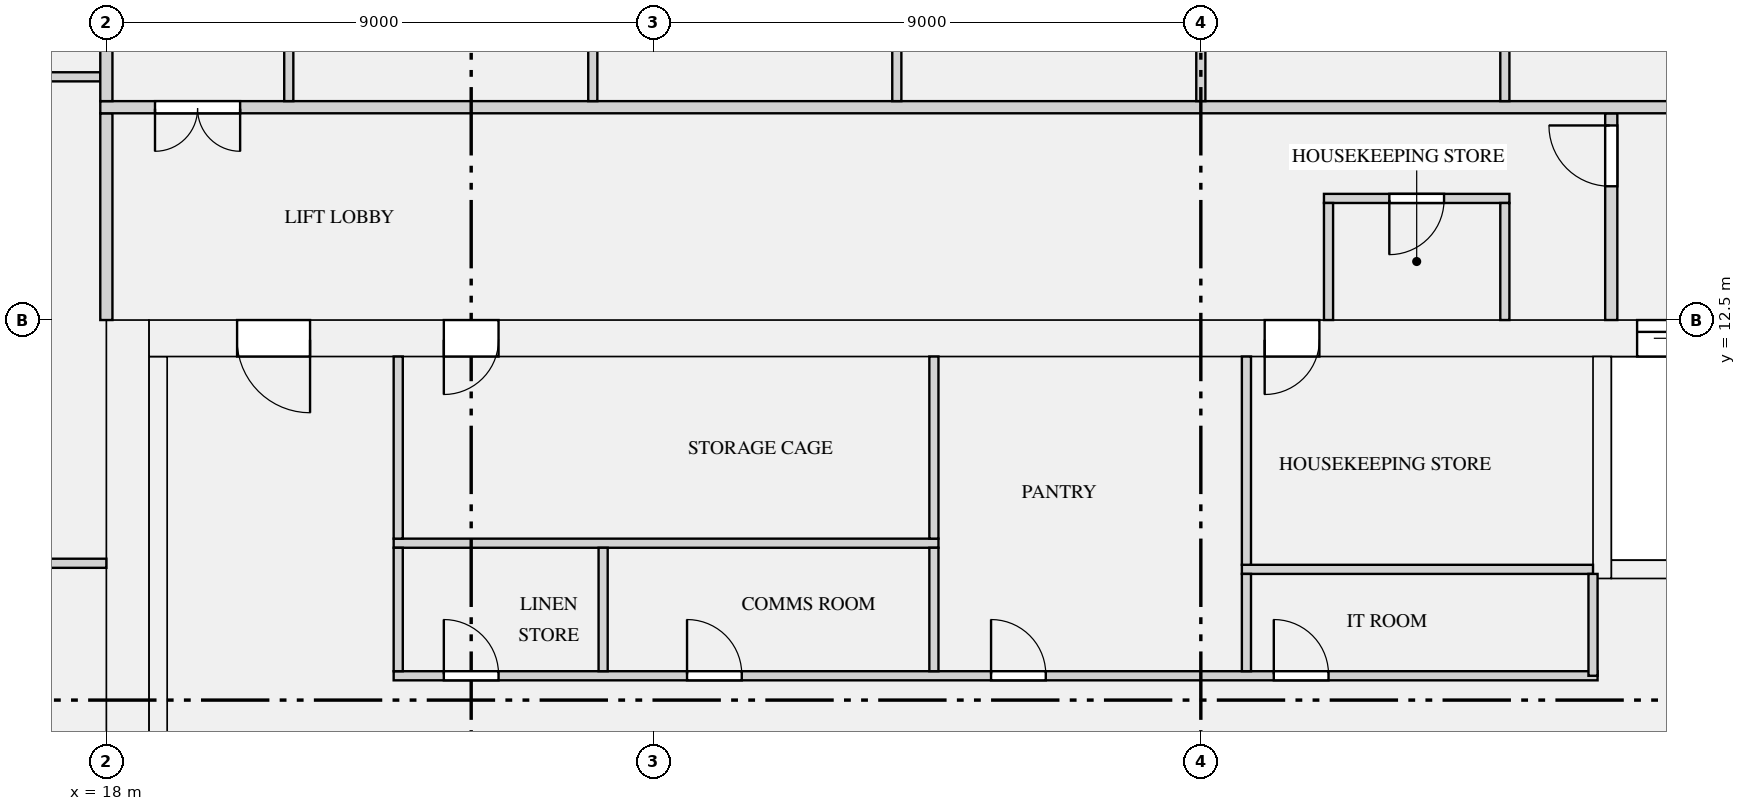
"""IFC4 building model, lengths in metres.
Left out: names, types, materials, properties, quantities, classifications, styles, units other than length and angle.
Written with IfcOpenShell. Run it as: python <this file> out.ifc"""

import sys

from ifc_helpers import new_model, si_unit, direction, frame, frame_2d, origin, place, context, subcontext, project, spatial, rectangle, extrude, element, fill, save


model = new_model("IFC4")
c1 = context("Model", 3, precision=1e-05, world=origin(), true_north=direction((0.0, 1.0)))
c2 = subcontext(c1, "Body", "Model", "MODEL_VIEW")
j1 = project(units=[si_unit("LENGTHUNIT", "METRE"), si_unit("PLANEANGLEUNIT", "RADIAN")], contexts=[c1])
p1 = place(None, origin())
s1 = spatial("IfcSite", under=j1, at=p1, CompositionType="ELEMENT")
p2 = place(p1, origin())
s2 = spatial("IfcBuilding", under=s1, at=p2, CompositionType="ELEMENT")
p3 = place(p2, frame((0.0, 0.0, 150.75)))
s3 = spatial("IfcBuildingStorey", under=s2, at=p3, CompositionType="ELEMENT", Elevation=150.75)
p4 = place(p3, frame((18.35, 0.0, 0.0), z_axis=(0.0, 0.0, 1.0), x_axis=(0.0, 1.0, 0.0)))
e1 = element("IfcWall", 1, at=p4, inside=s3, PredefinedType="SHEAR", context=c2, shape_type="SweptSolid", body=[
    extrude(rectangle(XDim=12.5, YDim=0.7, at=frame_2d((6.25, 0.0))), origin(), (0.0, 0.0, 1.0), 3.15),
])
p5 = place(p3, frame((18.7, 12.2, 0.0), z_axis=(0.0, 0.0, 1.0), x_axis=(1.0, 0.0, 0.0)))
e2 = element("IfcWall", 2, at=p5, inside=s3, PredefinedType="SHEAR", context=c2, shape_type="SweptSolid", body=[
    extrude(rectangle(XDim=34.6, YDim=0.6, at=frame_2d((17.3, 0.0))), origin(), (0.0, 0.0, 1.0), 3.15),
])
p6 = place(p5, frame((24.475, 0.0, 0.0)))
e3 = element("IfcOpeningElement", 3, at=p6, cuts=e2, PredefinedType="OPENING", context=c2, shape_type="SweptSolid", body=[
    extrude(rectangle(XDim=1.1, YDim=2.1, at=frame_2d((0.55, 1.05))), frame((0.0, 0.31, 0.0), z_axis=(0.0, -1.0, 0.0), x_axis=(1.0, 0.0, 0.0)), (0.0, 0.0, 1.0), 0.62),
])
p7 = place(p5, frame((26.725, 0.0, 0.0)))
e4 = element("IfcOpeningElement", 4, at=p7, cuts=e2, PredefinedType="OPENING", context=c2, shape_type="SweptSolid", body=[
    extrude(rectangle(XDim=1.1, YDim=2.1, at=frame_2d((0.55, 1.05))), frame((0.0, 0.31, 0.0), z_axis=(0.0, -1.0, 0.0), x_axis=(1.0, 0.0, 0.0)), (0.0, 0.0, 1.0), 0.62),
])
p8 = place(p5, frame((28.975, 0.0, 0.0)))
e5 = element("IfcOpeningElement", 5, at=p8, cuts=e2, PredefinedType="OPENING", context=c2, shape_type="SweptSolid", body=[
    extrude(rectangle(XDim=1.1, YDim=2.1, at=frame_2d((0.55, 1.05))), frame((0.0, 0.31, 0.0), z_axis=(0.0, -1.0, 0.0), x_axis=(1.0, 0.0, 0.0)), (0.0, 0.0, 1.0), 0.62),
])
p9 = place(p5, frame((4.85, 0.0, 0.0)))
e6 = element("IfcOpeningElement", 6, at=p9, cuts=e2, PredefinedType="OPENING", context=c2, shape_type="SweptSolid", body=[
    extrude(rectangle(XDim=0.9, YDim=2.1, at=frame_2d((0.45, 1.05))), frame((0.0, 0.31, 0.0), z_axis=(0.0, -1.0, 0.0), x_axis=(1.0, 0.0, 0.0)), (0.0, 0.0, 1.0), 0.62),
])
p10 = place(p5, frame((18.35, 0.0, 0.0)))
e7 = element("IfcOpeningElement", 7, at=p10, cuts=e2, PredefinedType="OPENING", context=c2, shape_type="SweptSolid", body=[
    extrude(rectangle(XDim=0.9, YDim=2.1, at=frame_2d((0.45, 1.05))), frame((0.0, 0.31, 0.0), z_axis=(0.0, -1.0, 0.0), x_axis=(1.0, 0.0, 0.0)), (0.0, 0.0, 1.0), 0.62),
])
p11 = place(p5, frame((1.45, 0.0, 0.0)))
e8 = element("IfcOpeningElement", 8, at=p11, cuts=e2, PredefinedType="OPENING", context=c2, shape_type="SweptSolid", body=[
    extrude(rectangle(XDim=1.2, YDim=2.1, at=frame_2d((0.6, 1.05))), frame((0.0, 0.31, 0.0), z_axis=(0.0, -1.0, 0.0), x_axis=(1.0, 0.0, 0.0)), (0.0, 0.0, 1.0), 0.62),
])
p12 = place(p5, frame((31.95, 0.0, 0.0)))
e9 = element("IfcOpeningElement", 9, at=p12, cuts=e2, PredefinedType="OPENING", context=c2, shape_type="SweptSolid", body=[
    extrude(rectangle(XDim=1.2, YDim=2.1, at=frame_2d((0.6, 1.05))), frame((0.0, 0.31, 0.0), z_axis=(0.0, -1.0, 0.0), x_axis=(1.0, 0.0, 0.0)), (0.0, 0.0, 1.0), 0.62),
])
p13 = place(p3, frame((18.85, 1.0, 0.0), z_axis=(0.0, 0.0, 1.0), x_axis=(0.0, 1.0, 0.0)))
e10 = element("IfcWall", 10, at=p13, inside=s3, PredefinedType="SHEAR", context=c2, shape_type="SweptSolid", body=[
    extrude(rectangle(XDim=10.9, YDim=0.3, at=frame_2d((5.45, 0.0))), origin(), (0.0, 0.0, 1.0), 3.15),
])
p14 = place(p3, frame((42.75, 8.4, 0.0), z_axis=(0.0, 0.0, 1.0), x_axis=(1.0, 0.0, 0.0)))
e11 = element("IfcWall", 11, at=p14, inside=s3, PredefinedType="SHEAR", context=c2, shape_type="SweptSolid", body=[
    extrude(rectangle(XDim=1.95, YDim=0.3, at=frame_2d((0.975, 0.0))), origin(), (0.0, 0.0, 1.0), 3.15),
])
p15 = place(p3, frame((42.6, 8.25, 0.0), z_axis=(0.0, 0.0, 1.0), x_axis=(0.0, 1.0, 0.0)))
e12 = element("IfcWall", 12, at=p15, inside=s3, PredefinedType="SHEAR", context=c2, shape_type="SweptSolid", body=[
    extrude(rectangle(XDim=3.65, YDim=0.3, at=frame_2d((1.825, 0.0))), origin(), (0.0, 0.0, 1.0), 3.15),
])
p16 = place(p3, frame((22.725, 6.65, 0.0), z_axis=(0.0, 0.0, 1.0), x_axis=(1.0, 0.0, 0.0)))
e13 = element("IfcWall", 13, at=p16, inside=s3, PredefinedType="PARTITIONING", context=c2, shape_type="SweptSolid", body=[
    extrude(rectangle(XDim=19.8, YDim=0.15, at=frame_2d((9.9, 0.0))), origin(), (0.0, 0.0, 1.0), 2.83),
])
p17 = place(p16, frame((0.825, 0.0, 0.0)))
e14 = element("IfcOpeningElement", 14, at=p17, cuts=e13, PredefinedType="OPENING", context=c2, shape_type="SweptSolid", body=[
    extrude(rectangle(XDim=0.9, YDim=2.1, at=frame_2d((0.45, 1.05))), frame((0.0, 0.085, 0.0), z_axis=(0.0, -1.0, 0.0), x_axis=(1.0, 0.0, 0.0)), (0.0, 0.0, 1.0), 0.17),
])
p18 = place(p16, frame((4.825, 0.0, 0.0)))
e15 = element("IfcOpeningElement", 15, at=p18, cuts=e13, PredefinedType="OPENING", context=c2, shape_type="SweptSolid", body=[
    extrude(rectangle(XDim=0.9, YDim=2.1, at=frame_2d((0.45, 1.05))), frame((0.0, 0.085, 0.0), z_axis=(0.0, -1.0, 0.0), x_axis=(1.0, 0.0, 0.0)), (0.0, 0.0, 1.0), 0.17),
])
p19 = place(p16, frame((9.825, 0.0, 0.0)))
e16 = element("IfcOpeningElement", 16, at=p19, cuts=e13, PredefinedType="OPENING", context=c2, shape_type="SweptSolid", body=[
    extrude(rectangle(XDim=0.9, YDim=2.1, at=frame_2d((0.45, 1.05))), frame((0.0, 0.085, 0.0), z_axis=(0.0, -1.0, 0.0), x_axis=(1.0, 0.0, 0.0)), (0.0, 0.0, 1.0), 0.17),
])
p20 = place(p16, frame((14.475, 0.0, 0.0)))
e17 = element("IfcOpeningElement", 17, at=p20, cuts=e13, PredefinedType="OPENING", context=c2, shape_type="SweptSolid", body=[
    extrude(rectangle(XDim=0.9, YDim=2.1, at=frame_2d((0.45, 1.05))), frame((0.0, 0.085, 0.0), z_axis=(0.0, -1.0, 0.0), x_axis=(1.0, 0.0, 0.0)), (0.0, 0.0, 1.0), 0.17),
])
p21 = place(p3, frame((36.675, 8.4, 0.0), z_axis=(0.0, 0.0, 1.0), x_axis=(1.0, 0.0, 0.0)))
e18 = element("IfcWall", 18, at=p21, inside=s3, PredefinedType="PARTITIONING", context=c2, shape_type="SweptSolid", body=[
    extrude(rectangle(XDim=5.775, YDim=0.15, at=frame_2d((2.887, 0.0))), origin(), (0.0, 0.0, 1.0), 2.83),
])
p22 = place(p3, frame((22.725, 8.83, 0.0), z_axis=(0.0, 0.0, 1.0), x_axis=(1.0, 0.0, 0.0)))
e19 = element("IfcWall", 19, at=p22, inside=s3, PredefinedType="PARTITIONING", context=c2, shape_type="SweptSolid", body=[
    extrude(rectangle(XDim=8.96, YDim=0.15, at=frame_2d((4.48, 0.0))), origin(), (0.0, 0.0, 1.0), 2.83),
])
p23 = place(p3, frame((38.025, 14.5, 0.0), z_axis=(0.0, 0.0, 1.0), x_axis=(1.0, 0.0, 0.0)))
e20 = element("IfcWall", 20, at=p23, inside=s3, PredefinedType="PARTITIONING", context=c2, shape_type="SweptSolid", body=[
    extrude(rectangle(XDim=3.05, YDim=0.15, at=frame_2d((1.525, 0.0))), origin(), (0.0, 0.0, 1.0), 2.83),
])
p24 = place(p23, frame((1.075, 0.0, 0.0)))
e21 = element("IfcOpeningElement", 21, at=p24, cuts=e20, PredefinedType="OPENING", context=c2, shape_type="SweptSolid", body=[
    extrude(rectangle(XDim=0.9, YDim=2.1, at=frame_2d((0.45, 1.05))), frame((0.0, 0.085, 0.0), z_axis=(0.0, -1.0, 0.0), x_axis=(1.0, 0.0, 0.0)), (0.0, 0.0, 1.0), 0.17),
])
p25 = place(p3, frame((42.45, 6.65, 0.0), z_axis=(0.0, 0.0, 1.0), x_axis=(0.0, 1.0, 0.0)))
e22 = element("IfcWall", 22, at=p25, inside=s3, PredefinedType="PARTITIONING", context=c2, shape_type="SweptSolid", body=[
    extrude(rectangle(XDim=1.675, YDim=0.15, at=frame_2d((0.837, 0.0))), origin(), (0.0, 0.0, 1.0), 2.83),
])
for number, where, z_axis, x_axis in (
    (23, (22.8, 6.725, 0.0), (0.0, 0.0, 1.0), (0.0, 1.0, 0.0)),
    (24, (26.17, 6.725, 0.0), (0.0, 0.0, 1.0), (0.0, 1.0, 0.0)),
    (25, (31.61, 6.725, 0.0), (0.0, 0.0, 1.0), (0.0, 1.0, 0.0)),
):
    element("IfcWall", number, at=place(p3, frame(where, z_axis=z_axis, x_axis=x_axis)), inside=s3, PredefinedType="PARTITIONING", context=c2, shape_type="SweptSolid", body=[
        extrude(rectangle(XDim=2.03, YDim=0.15, at=frame_2d((1.015, 0.0))), origin(), (0.0, 0.0, 1.0), 2.83),
    ])
p26 = place(p3, frame((36.75, 6.725, 0.0), z_axis=(0.0, 0.0, 1.0), x_axis=(0.0, 1.0, 0.0)))
e26 = element("IfcWall", 26, at=p26, inside=s3, PredefinedType="PARTITIONING", context=c2, shape_type="SweptSolid", body=[
    extrude(rectangle(XDim=1.6, YDim=0.15, at=frame_2d((0.8, 0.0))), origin(), (0.0, 0.0, 1.0), 2.83),
])
p27 = place(p3, frame((36.75, 8.475, 0.0), z_axis=(0.0, 0.0, 1.0), x_axis=(0.0, 1.0, 0.0)))
e27 = element("IfcWall", 27, at=p27, inside=s3, PredefinedType="PARTITIONING", context=c2, shape_type="SweptSolid", body=[
    extrude(rectangle(XDim=3.425, YDim=0.15, at=frame_2d((1.712, 0.0))), origin(), (0.0, 0.0, 1.0), 2.83),
])
for number, where, z_axis, x_axis in (
    (28, (22.8, 8.905, 0.0), (0.0, 0.0, 1.0), (0.0, 1.0, 0.0)),
    (29, (31.61, 8.905, 0.0), (0.0, 0.0, 1.0), (0.0, 1.0, 0.0)),
):
    element("IfcWall", number, at=place(p3, frame(where, z_axis=z_axis, x_axis=x_axis)), inside=s3, PredefinedType="PARTITIONING", context=c2, shape_type="SweptSolid", body=[
        extrude(rectangle(XDim=2.995, YDim=0.15, at=frame_2d((1.498, 0.0))), origin(), (0.0, 0.0, 1.0), 2.83),
    ])
p28 = place(p3, frame((18.0, 12.5, 0.0), z_axis=(0.0, 0.0, 1.0), x_axis=(0.0, 1.0, 0.0)))
e30 = element("IfcWall", 30, at=p28, inside=s3, PredefinedType="PARTITIONING", context=c2, shape_type="SweptSolid", body=[
    extrude(rectangle(XDim=3.4, YDim=0.2, at=frame_2d((1.7, 0.0))), origin(), (0.0, 0.0, 1.0), 2.83),
])
for number, where, z_axis, x_axis in (
    (31, (38.1, 12.5, 0.0), (0.0, 0.0, 1.0), (0.0, 1.0, 0.0)),
    (32, (41.0, 12.5, 0.0), (0.0, 0.0, 1.0), (0.0, 1.0, 0.0)),
):
    element("IfcWall", number, at=place(p3, frame(where, z_axis=z_axis, x_axis=x_axis)), inside=s3, PredefinedType="PARTITIONING", context=c2, shape_type="SweptSolid", body=[
        extrude(rectangle(XDim=1.925, YDim=0.15, at=frame_2d((0.962, 0.0))), origin(), (0.0, 0.0, 1.0), 2.83),
    ])
p29 = place(p3, frame((42.75, 12.5, 0.0), z_axis=(0.0, 0.0, 1.0), x_axis=(0.0, 1.0, 0.0)))
e33 = element("IfcWall", 33, at=p29, inside=s3, PredefinedType="PARTITIONING", context=c2, shape_type="SweptSolid", body=[
    extrude(rectangle(XDim=3.4, YDim=0.2, at=frame_2d((1.7, 0.0))), origin(), (0.0, 0.0, 1.0), 2.83),
])
p30 = place(p29, frame((2.2, 0.0, 0.0)))
e34 = element("IfcOpeningElement", 34, at=p30, cuts=e33, PredefinedType="OPENING", context=c2, shape_type="SweptSolid", body=[
    extrude(rectangle(XDim=1.0, YDim=2.1, at=frame_2d((0.5, 1.05))), frame((0.0, 0.11, 0.0), z_axis=(0.0, -1.0, 0.0), x_axis=(1.0, 0.0, 0.0)), (0.0, 0.0, 1.0), 0.22),
])
p31 = place(p3, frame((7.7, 16.5, 0.0), z_axis=(0.0, 0.0, 1.0), x_axis=(1.0, 0.0, 0.0)))
e35 = element("IfcWall", 35, at=p31, inside=s3, PredefinedType="PARTITIONING", context=c2, shape_type="SweptSolid", body=[
    extrude(rectangle(XDim=10.2, YDim=0.15, at=frame_2d((5.1, 0.0))), origin(), (0.0, 0.0, 1.0), 2.83),
])
p32 = place(p31, frame((7.3, 0.0, 0.0)))
e36 = element("IfcOpeningElement", 36, at=p32, cuts=e35, PredefinedType="OPENING", context=c2, shape_type="SweptSolid", body=[
    extrude(rectangle(XDim=1.5, YDim=2.1, at=frame_2d((0.75, 1.05))), frame((0.0, 0.085, 0.0), z_axis=(0.0, -1.0, 0.0), x_axis=(1.0, 0.0, 0.0)), (0.0, 0.0, 1.0), 0.17),
])
p33 = place(p3, frame((9.075, 8.5, 0.0), z_axis=(0.0, 0.0, 1.0), x_axis=(1.0, 0.0, 0.0)))
e37 = element("IfcWall", 37, at=p33, inside=s3, PredefinedType="PARTITIONING", context=c2, shape_type="SweptSolid", body=[
    extrude(rectangle(XDim=8.925, YDim=0.15, at=frame_2d((4.462, 0.0))), origin(), (0.0, 0.0, 1.0), 2.83),
])
p34 = place(p33, frame((1.725, 0.0, 0.0)))
e38 = element("IfcOpeningElement", 38, at=p34, cuts=e37, PredefinedType="OPENING", context=c2, shape_type="SweptSolid", body=[
    extrude(rectangle(XDim=0.9, YDim=2.1, at=frame_2d((0.45, 1.05))), frame((0.0, 0.085, 0.0), z_axis=(0.0, -1.0, 0.0), x_axis=(1.0, 0.0, 0.0)), (0.0, 0.0, 1.0), 0.17),
])
p35 = place(p33, frame((6.225, 0.0, 0.0)))
e39 = element("IfcOpeningElement", 39, at=p35, cuts=e37, PredefinedType="OPENING", context=c2, shape_type="SweptSolid", body=[
    extrude(rectangle(XDim=0.9, YDim=2.1, at=frame_2d((0.45, 1.05))), frame((0.0, 0.085, 0.0), z_axis=(0.0, -1.0, 0.0), x_axis=(1.0, 0.0, 0.0)), (0.0, 0.0, 1.0), 0.17),
])
p36 = place(p3, frame((17.9, 16.0, 0.0), z_axis=(0.0, 0.0, 1.0), x_axis=(1.0, 0.0, 0.0)))
e40 = element("IfcWall", 40, at=p36, inside=s3, PredefinedType="PARTITIONING", context=c2, shape_type="SweptSolid", body=[
    extrude(rectangle(XDim=36.2, YDim=0.2, at=frame_2d((18.1, 0.0))), origin(), (0.0, 0.0, 1.0), 2.83),
])
p37 = place(p36, frame((0.9, 0.0, 0.0)))
e41 = element("IfcOpeningElement", 41, at=p37, cuts=e40, PredefinedType="OPENING", context=c2, shape_type="SweptSolid", body=[
    extrude(rectangle(XDim=1.4, YDim=2.1, at=frame_2d((0.7, 1.05))), frame((0.0, 0.11, 0.0), z_axis=(0.0, -1.0, 0.0), x_axis=(1.0, 0.0, 0.0)), (0.0, 0.0, 1.0), 0.22),
])
p38 = place(p36, frame((33.9, 0.0, 0.0)))
e42 = element("IfcOpeningElement", 42, at=p38, cuts=e40, PredefinedType="OPENING", context=c2, shape_type="SweptSolid", body=[
    extrude(rectangle(XDim=1.4, YDim=2.1, at=frame_2d((0.7, 1.05))), frame((0.0, 0.11, 0.0), z_axis=(0.0, -1.0, 0.0), x_axis=(1.0, 0.0, 0.0)), (0.0, 0.0, 1.0), 0.22),
])
p39 = place(p3, frame((18.0, 16.1, 0.0), z_axis=(0.0, 0.0, 1.0), x_axis=(0.0, 1.0, 0.0)))
e43 = element("IfcWall", 43, at=p39, inside=s3, PredefinedType="PARTITIONING", context=c2, shape_type="SweptSolid", body=[
    extrude(rectangle(XDim=7.8, YDim=0.2, at=frame_2d((3.9, 0.0))), origin(), (0.0, 0.0, 1.0), 2.83),
])
for number, where, z_axis, x_axis in (
    (44, (21.0, 16.1, 0.0), (0.0, 0.0, 1.0), (0.0, 1.0, 0.0)),
    (45, (26.0, 16.1, 0.0), (0.0, 0.0, 1.0), (0.0, 1.0, 0.0)),
    (46, (31.0, 16.1, 0.0), (0.0, 0.0, 1.0), (0.0, 1.0, 0.0)),
    (47, (36.0, 16.1, 0.0), (0.0, 0.0, 1.0), (0.0, 1.0, 0.0)),
    (48, (41.0, 16.1, 0.0), (0.0, 0.0, 1.0), (0.0, 1.0, 0.0)),
):
    element("IfcWall", number, at=place(p3, frame(where, z_axis=z_axis, x_axis=x_axis)), inside=s3, PredefinedType="PARTITIONING", context=c2, shape_type="SweptSolid", body=[
        extrude(rectangle(XDim=4.825, YDim=0.15, at=frame_2d((2.413, 0.0))), origin(), (0.0, 0.0, 1.0), 2.83),
    ])
p40 = place(p6, origin())
e49 = element("IfcDoor", 49, at=p40, inside=s3, OperationType="DOUBLE_DOOR_SLIDING", PredefinedType="DOOR", context=c2, shape_type="SweptSolid", body=[
    extrude(rectangle(XDim=1.1, YDim=2.1, at=frame_2d((0.55, 1.05))), frame((0.0, 0.025, 0.0), z_axis=(0.0, -1.0, 0.0), x_axis=(1.0, 0.0, 0.0)), (0.0, 0.0, 1.0), 0.05),
])
fill(e3, e49)
p41 = place(p24, frame((0.9, 0.0, 0.0), z_axis=(0.0, 0.0, 1.0), x_axis=(-1.0, 0.0, 0.0)))
e50 = element("IfcDoor", 50, at=p41, inside=s3, OperationType="SINGLE_SWING_RIGHT", PredefinedType="DOOR", context=c2, shape_type="SweptSolid", body=[
    extrude(rectangle(XDim=0.9, YDim=2.1, at=frame_2d((0.45, 1.05))), frame((0.0, 0.025, 0.0), z_axis=(0.0, -1.0, 0.0), x_axis=(1.0, 0.0, 0.0)), (0.0, 0.0, 1.0), 0.05),
])
fill(e21, e50)
p42 = place(p17, origin())
e51 = element("IfcDoor", 51, at=p42, inside=s3, OperationType="SINGLE_SWING_LEFT", PredefinedType="DOOR", context=c2, shape_type="SweptSolid", body=[
    extrude(rectangle(XDim=0.9, YDim=2.1, at=frame_2d((0.45, 1.05))), frame((0.0, 0.025, 0.0), z_axis=(0.0, -1.0, 0.0), x_axis=(1.0, 0.0, 0.0)), (0.0, 0.0, 1.0), 0.05),
])
fill(e14, e51)
p43 = place(p18, origin())
e52 = element("IfcDoor", 52, at=p43, inside=s3, OperationType="SINGLE_SWING_LEFT", PredefinedType="DOOR", context=c2, shape_type="SweptSolid", body=[
    extrude(rectangle(XDim=0.9, YDim=2.1, at=frame_2d((0.45, 1.05))), frame((0.0, 0.025, 0.0), z_axis=(0.0, -1.0, 0.0), x_axis=(1.0, 0.0, 0.0)), (0.0, 0.0, 1.0), 0.05),
])
fill(e15, e52)
p44 = place(p19, origin())
e53 = element("IfcDoor", 53, at=p44, inside=s3, OperationType="SINGLE_SWING_LEFT", PredefinedType="DOOR", context=c2, shape_type="SweptSolid", body=[
    extrude(rectangle(XDim=0.9, YDim=2.1, at=frame_2d((0.45, 1.05))), frame((0.0, 0.025, 0.0), z_axis=(0.0, -1.0, 0.0), x_axis=(1.0, 0.0, 0.0)), (0.0, 0.0, 1.0), 0.05),
])
fill(e16, e53)
p45 = place(p9, frame((0.9, 0.0, 0.0), z_axis=(0.0, 0.0, 1.0), x_axis=(-1.0, 0.0, 0.0)))
e54 = element("IfcDoor", 54, at=p45, inside=s3, OperationType="SINGLE_SWING_RIGHT", PredefinedType="DOOR", context=c2, shape_type="SweptSolid", body=[
    extrude(rectangle(XDim=0.9, YDim=2.1, at=frame_2d((0.45, 1.05))), frame((0.0, 0.025, 0.0), z_axis=(0.0, -1.0, 0.0), x_axis=(1.0, 0.0, 0.0)), (0.0, 0.0, 1.0), 0.05),
])
fill(e6, e54)
p46 = place(p20, origin())
e55 = element("IfcDoor", 55, at=p46, inside=s3, OperationType="SINGLE_SWING_LEFT", PredefinedType="DOOR", context=c2, shape_type="SweptSolid", body=[
    extrude(rectangle(XDim=0.9, YDim=2.1, at=frame_2d((0.45, 1.05))), frame((0.0, 0.025, 0.0), z_axis=(0.0, -1.0, 0.0), x_axis=(1.0, 0.0, 0.0)), (0.0, 0.0, 1.0), 0.05),
])
fill(e17, e55)
p47 = place(p10, frame((0.9, 0.0, 0.0), z_axis=(0.0, 0.0, 1.0), x_axis=(-1.0, 0.0, 0.0)))
e56 = element("IfcDoor", 56, at=p47, inside=s3, OperationType="SINGLE_SWING_RIGHT", PredefinedType="DOOR", context=c2, shape_type="SweptSolid", body=[
    extrude(rectangle(XDim=0.9, YDim=2.1, at=frame_2d((0.45, 1.05))), frame((0.0, 0.025, 0.0), z_axis=(0.0, -1.0, 0.0), x_axis=(1.0, 0.0, 0.0)), (0.0, 0.0, 1.0), 0.05),
])
fill(e7, e56)
p48 = place(p11, frame((1.2, 0.0, 0.0), z_axis=(0.0, 0.0, 1.0), x_axis=(-1.0, 0.0, 0.0)))
e57 = element("IfcDoor", 57, at=p48, inside=s3, OperationType="SINGLE_SWING_LEFT", PredefinedType="DOOR", context=c2, shape_type="SweptSolid", body=[
    extrude(rectangle(XDim=1.2, YDim=2.1, at=frame_2d((0.6, 1.05))), frame((0.0, 0.025, 0.0), z_axis=(0.0, -1.0, 0.0), x_axis=(1.0, 0.0, 0.0)), (0.0, 0.0, 1.0), 0.05),
])
fill(e8, e57)
p49 = place(p30, origin())
e58 = element("IfcDoor", 58, at=p49, inside=s3, OperationType="SINGLE_SWING_RIGHT", PredefinedType="DOOR", context=c2, shape_type="SweptSolid", body=[
    extrude(rectangle(XDim=1.0, YDim=2.1, at=frame_2d((0.5, 1.05))), frame((0.0, 0.025, 0.0), z_axis=(0.0, -1.0, 0.0), x_axis=(1.0, 0.0, 0.0)), (0.0, 0.0, 1.0), 0.05),
])
fill(e34, e58)
p50 = place(p37, frame((1.4, 0.0, 0.0), z_axis=(0.0, 0.0, 1.0), x_axis=(-1.0, 0.0, 0.0)))
e59 = element("IfcDoor", 59, at=p50, inside=s3, OperationType="DOUBLE_DOOR_SINGLE_SWING", PredefinedType="DOOR", context=c2, shape_type="SweptSolid", body=[
    extrude(rectangle(XDim=1.4, YDim=2.1, at=frame_2d((0.7, 1.05))), frame((0.0, 0.025, 0.0), z_axis=(0.0, -1.0, 0.0), x_axis=(1.0, 0.0, 0.0)), (0.0, 0.0, 1.0), 0.05),
])
fill(e41, e59)
save(model, sys.argv[1])
